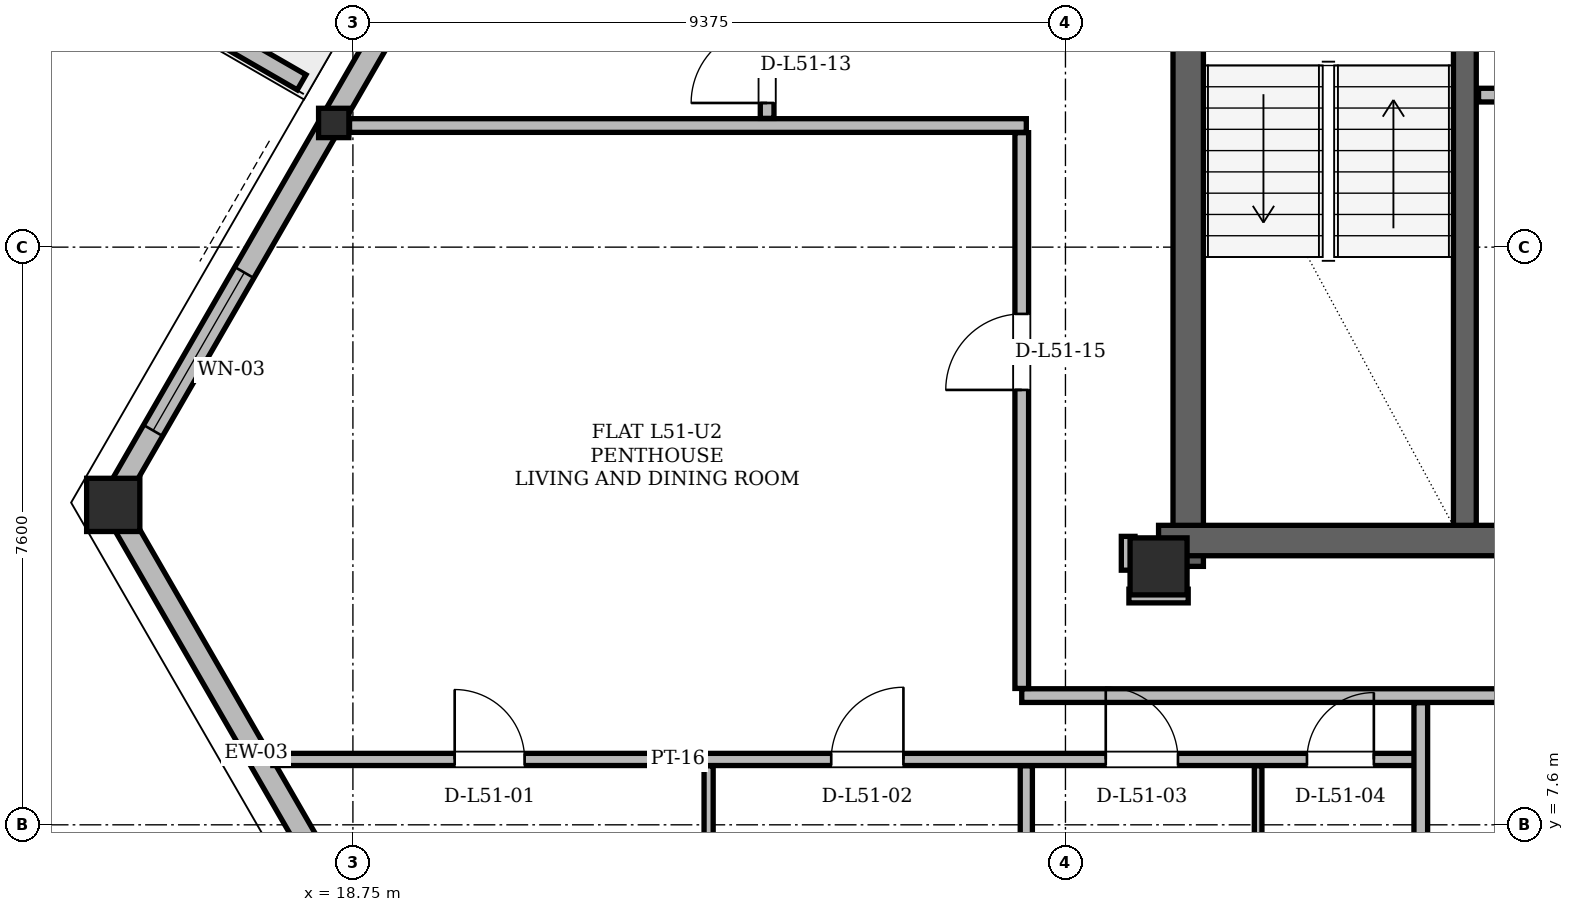
"""IFC4 building model, lengths in metres.
Left out: names, types, materials, properties, quantities, classifications, styles, units other than length and angle.
Written with IfcOpenShell. Run it as: python <this file> out.ifc"""

import sys

from ifc_helpers import new_model, si_unit, direction, frame, frame_2d, origin, origin_2d, place, context, subcontext, project, spatial, polyline, rectangle, hollow_rectangle, i_section, outline, extrude, element, fill, save


model = new_model("IFC4")
c1 = context("Model", 3, precision=1e-05, world=origin(), true_north=direction((0.0, 1.0)))
c2 = subcontext(c1, "Body", "Model", "MODEL_VIEW")
j1 = project(units=[si_unit("LENGTHUNIT", "METRE"), si_unit("PLANEANGLEUNIT", "RADIAN")], contexts=[c1])
p1 = place(None, origin())
s1 = spatial("IfcSite", under=j1, at=p1, CompositionType="ELEMENT")
p2 = place(p1, origin())
s2 = spatial("IfcBuilding", under=s1, at=p2, CompositionType="ELEMENT")
p3 = place(p2, frame((0.0, 0.0, 193.8)))
s3 = spatial("IfcBuildingStorey", under=s2, at=p3, CompositionType="ELEMENT", Elevation=193.8)
p4 = place(p3, frame((29.35, 11.0, 0.0), z_axis=(0.0, 0.0, 1.0), x_axis=(1.0, 0.0, 0.0)))
e1 = element("IfcColumn", 1, at=p4, inside=s3, PredefinedType="COLUMN", context=c2, shape_type="SweptSolid", body=[
    extrude(hollow_rectangle(XDim=0.75, YDim=0.75, WallThickness=0.06, at=origin_2d()), origin(), (0.0, 0.0, 1.0), 3.6),
])
p5 = place(p3, frame((15.574, 11.839, 0.004), z_axis=(0.012710485816, -0.016788716559, 0.99977826669), x_axis=(0.797280432378, 0.603609072286, 0.0)))
e2 = element("IfcColumn", 2, at=p5, inside=s3, PredefinedType="COLUMN", context=c2, shape_type="SweptSolid", body=[
    extrude(hollow_rectangle(XDim=0.7, YDim=0.7, WallThickness=0.055, at=origin_2d()), origin(), (0.0, 0.0, 1.0), 3.592),
])
p6 = place(p3, frame((18.472, 16.86, 0.004), z_axis=(0.014070134403, -0.014545936049, 0.99979520256), x_axis=(0.718764553201, 0.695253563143, 0.0)))
e3 = element("IfcColumn", 3, at=p6, inside=s3, PredefinedType="COLUMN", context=c2, shape_type="SweptSolid", body=[
    extrude(i_section(OverallWidth=0.399, OverallDepth=0.386, WebThickness=0.021, FlangeThickness=0.033, at=origin_2d()), origin(), (0.0, 0.0, 1.0), 3.592),
])
p7 = place(p3, frame((29.74, 11.0, 0.0), z_axis=(0.0, 0.0, 1.0), x_axis=(0.0, 1.0, 0.0)))
e4 = element("IfcWall", 4, at=p7, inside=s3, PredefinedType="SHEAR", context=c2, shape_type="SweptSolid", body=[
    extrude(rectangle(XDim=13.3, YDim=0.4, at=frame_2d((6.65, 0.0))), origin(), (0.0, 0.0, 1.0), 3.38),
])
p8 = place(p3, frame((29.35, 11.34, 0.0), z_axis=(0.0, 0.0, 1.0), x_axis=(1.0, 0.0, 0.0)))
e5 = element("IfcWall", 5, at=p8, inside=s3, PredefinedType="SHEAR", context=c2, shape_type="SweptSolid", body=[
    extrude(rectangle(XDim=7.1, YDim=0.4, at=frame_2d((3.55, 0.0))), origin(), (0.0, 0.0, 1.0), 3.38),
])
p9 = place(p3, frame((33.38, 11.54, 0.0), z_axis=(0.0, 0.0, 1.0), x_axis=(0.0, 1.0, 0.0)))
e6 = element("IfcWall", 6, at=p9, inside=s3, PredefinedType="SHEAR", context=c2, shape_type="SweptSolid", body=[
    extrude(rectangle(XDim=7.62, YDim=0.3, at=frame_2d((3.81, 0.0))), origin(), (0.0, 0.0, 1.0), 3.38),
])
p10 = place(p3, frame((15.574, 11.839, 0.0), z_axis=(0.0, 0.0, 1.0), x_axis=(0.500006337612, -0.866021744731, 0.0)))
e7 = element("IfcWall", 7, at=p10, inside=s3, PredefinedType="SOLIDWALL", context=c2, shape_type="SweptSolid", body=[
    extrude(rectangle(XDim=7.618, YDim=0.29, at=frame_2d((3.809, 0.0))), origin(), (0.0, 0.0, 1.0), 2.677),
])
p11 = place(p3, frame((33.691, 43.219, 0.0), z_axis=(0.0, 0.0, 1.0), x_axis=(-0.499997159266, -0.866027043877, 0.0)))
e8 = element("IfcWall", 8, at=p11, inside=s3, PredefinedType="SOLIDWALL", context=c2, shape_type="SweptSolid", body=[
    extrude(rectangle(XDim=36.235, YDim=0.29, at=frame_2d((18.117, 0.0))), origin(), (0.0, 0.0, 1.0), 2.677),
])
p12 = place(p11, frame((6.579, 0.0, 0.0)))
e9 = element("IfcOpeningElement", 9, at=p12, cuts=e8, PredefinedType="OPENING", context=c2, shape_type="SweptSolid", body=[
    extrude(rectangle(XDim=1.5, YDim=2.2, at=frame_2d((0.75, 1.1))), frame((0.0, 0.145, 0.0), z_axis=(0.0, -1.0, 0.0), x_axis=(1.0, 0.0, 0.0)), (0.0, 0.0, 1.0), 0.29),
])
p13 = place(p11, frame((26.7, 0.0, 0.0)))
e10 = element("IfcOpeningElement", 10, at=p13, cuts=e8, PredefinedType="OPENING", context=c2, shape_type="SweptSolid", body=[
    extrude(rectangle(XDim=1.5, YDim=2.2, at=frame_2d((0.75, 1.1))), frame((0.0, 0.145, 0.0), z_axis=(0.0, -1.0, 0.0), x_axis=(1.0, 0.0, 0.0)), (0.0, 0.0, 1.0), 0.29),
])
p14 = place(p11, frame((32.74, 0.0, 0.85)))
e11 = element("IfcOpeningElement", 11, at=p14, cuts=e8, PredefinedType="OPENING", context=c2, shape_type="SweptSolid", body=[
    extrude(rectangle(XDim=2.4, YDim=1.717, at=frame_2d((1.2, 0.858))), frame((0.0, 0.145, 0.0), z_axis=(0.0, -1.0, 0.0), x_axis=(1.0, 0.0, 0.0)), (0.0, 0.0, 1.0), 0.29),
])
p15 = place(p11, frame((21.971, 0.0, 0.85)))
e12 = element("IfcOpeningElement", 12, at=p15, cuts=e8, PredefinedType="OPENING", context=c2, shape_type="SweptSolid", body=[
    extrude(rectangle(XDim=2.0, YDim=1.717, at=frame_2d((1.0, 0.858))), frame((0.0, 0.145, 0.0), z_axis=(0.0, -1.0, 0.0), x_axis=(1.0, 0.0, 0.0)), (0.0, 0.0, 1.0), 0.29),
])
p16 = place(p11, frame((2.383, 0.0, 0.85)))
e13 = element("IfcOpeningElement", 13, at=p16, cuts=e8, PredefinedType="OPENING", context=c2, shape_type="SweptSolid", body=[
    extrude(rectangle(XDim=1.6, YDim=1.7, at=frame_2d((0.8, 0.85))), frame((0.0, 0.145, 0.0), z_axis=(0.0, -1.0, 0.0), x_axis=(1.0, 0.0, 0.0)), (0.0, 0.0, 1.0), 0.29),
])
p17 = place(p11, frame((13.348, 0.0, 0.85)))
e14 = element("IfcOpeningElement", 14, at=p17, cuts=e8, PredefinedType="OPENING", context=c2, shape_type="SweptSolid", body=[
    extrude(rectangle(XDim=3.0, YDim=1.717, at=frame_2d((1.5, 0.858))), frame((0.0, 0.145, 0.0), z_axis=(0.0, -1.0, 0.0), x_axis=(1.0, 0.0, 0.0)), (0.0, 0.0, 1.0), 0.29),
])
p18 = place(p3, frame((18.075, 17.368, 0.0), z_axis=(0.0, 0.0, 1.0), x_axis=(-0.866012356593, 0.500022597718, 0.0)))
e15 = element("IfcWall", 15, at=p18, inside=s3, PredefinedType="PARAPET", context=c2, shape_type="SweptSolid", body=[
    extrude(outline(polyline([(0.0, 0.0), (2.042, 0.0), (2.042, 1.1), (0.0, 1.32), (0.0, 0.0)])), frame((0.0, 0.115, 0.0), z_axis=(0.0, -1.0, 0.0), x_axis=(1.0, 0.0, 0.0)), (0.0, 0.0, 1.0), 0.23),
])
p19 = place(p3, frame((33.56, 17.2, 0.0), z_axis=(0.0, 0.0, 1.0), x_axis=(1.0, 0.0, 0.0)))
e16 = element("IfcWall", 16, at=p19, inside=s3, PredefinedType="PARTITIONING", context=c2, shape_type="SweptSolid", body=[
    extrude(rectangle(XDim=2.66, YDim=0.18, at=frame_2d((1.33, 0.0))), origin(), (0.0, 0.0, 1.0), 3.38),
])
p20 = place(p3, frame((17.697, 8.46, 0.0), z_axis=(0.0, 0.0, 1.0), x_axis=(1.0, 0.0, 0.0)))
e17 = element("IfcWall", 17, at=p20, inside=s3, PredefinedType="PARTITIONING", context=c2, shape_type="SweptSolid", body=[
    extrude(rectangle(XDim=15.153, YDim=0.16, at=frame_2d((7.577, 0.0))), origin(), (0.0, 0.0, 1.0), 2.913),
])
p21 = place(p20, frame((2.392, 0.0, 0.0)))
e18 = element("IfcOpeningElement", 18, at=p21, cuts=e17, PredefinedType="OPENING", context=c2, shape_type="SweptSolid", body=[
    extrude(rectangle(XDim=0.92, YDim=2.12, at=frame_2d((0.46, 1.06))), frame((0.0, 0.08, 0.0), z_axis=(0.0, -1.0, 0.0), x_axis=(1.0, 0.0, 0.0)), (0.0, 0.0, 1.0), 0.16),
])
p22 = place(p20, frame((7.346, 0.0, 0.0)))
e19 = element("IfcOpeningElement", 19, at=p22, cuts=e17, PredefinedType="OPENING", context=c2, shape_type="SweptSolid", body=[
    extrude(rectangle(XDim=0.95, YDim=2.1, at=frame_2d((0.475, 1.05))), frame((0.0, 0.08, 0.0), z_axis=(0.0, -1.0, 0.0), x_axis=(1.0, 0.0, 0.0)), (0.0, 0.0, 1.0), 0.16),
])
p23 = place(p20, frame((10.958, 0.0, 0.0)))
e20 = element("IfcOpeningElement", 20, at=p23, cuts=e17, PredefinedType="OPENING", context=c2, shape_type="SweptSolid", body=[
    extrude(rectangle(XDim=0.95, YDim=2.1, at=frame_2d((0.475, 1.05))), frame((0.0, 0.08, 0.0), z_axis=(0.0, -1.0, 0.0), x_axis=(1.0, 0.0, 0.0)), (0.0, 0.0, 1.0), 0.16),
])
p24 = place(p20, frame((13.606, 0.0, 0.0)))
e21 = element("IfcOpeningElement", 21, at=p24, cuts=e17, PredefinedType="OPENING", context=c2, shape_type="SweptSolid", body=[
    extrude(rectangle(XDim=0.88, YDim=2.08, at=frame_2d((0.44, 1.04))), frame((0.0, 0.08, 0.0), z_axis=(0.0, -1.0, 0.0), x_axis=(1.0, 0.0, 0.0)), (0.0, 0.0, 1.0), 0.16),
])
p25 = place(p3, frame((27.55, 9.3, 0.0), z_axis=(0.0, 0.0, 1.0), x_axis=(1.0, 0.0, 0.0)))
e22 = element("IfcWall", 22, at=p25, inside=s3, PredefinedType="PARTITIONING", context=c2, shape_type="SweptSolid", body=[
    extrude(rectangle(XDim=21.25, YDim=0.18, at=frame_2d((10.625, 0.0))), origin(), (0.0, 0.0, 1.0), 2.913),
])
p26 = place(p25, frame((7.1, 0.0, 0.0)))
e23 = element("IfcOpeningElement", 23, at=p26, cuts=e22, PredefinedType="OPENING", context=c2, shape_type="SweptSolid", body=[
    extrude(rectangle(XDim=1.3, YDim=2.2, at=frame_2d((0.65, 1.1))), frame((0.0, 0.09, 0.0), z_axis=(0.0, -1.0, 0.0), x_axis=(1.0, 0.0, 0.0)), (0.0, 0.0, 1.0), 0.18),
])
p27 = place(p25, frame((18.46, 0.0, 0.0)))
e24 = element("IfcOpeningElement", 24, at=p27, cuts=e22, PredefinedType="OPENING", context=c2, shape_type="SweptSolid", body=[
    extrude(rectangle(XDim=1.0, YDim=2.18, at=frame_2d((0.5, 1.09))), frame((0.0, 0.09, 0.0), z_axis=(0.0, -1.0, 0.0), x_axis=(1.0, 0.0, 0.0)), (0.0, 0.0, 1.0), 0.18),
])
p28 = place(p3, frame((28.96, 10.61, 0.0), z_axis=(0.0, 0.0, 1.0), x_axis=(1.0, 0.0, 0.0)))
e25 = element("IfcWall", 25, at=p28, inside=s3, PredefinedType="PARTITIONING", context=c2, shape_type="SweptSolid", body=[
    extrude(rectangle(XDim=0.78, YDim=0.18, at=frame_2d((0.39, 0.0))), origin(), (0.0, 0.0, 1.0), 3.38),
])
p29 = place(p3, frame((18.706, 16.8, 0.0), z_axis=(0.0, 0.0, 1.0), x_axis=(1.0, 0.0, 0.0)))
e26 = element("IfcWall", 26, at=p29, inside=s3, PredefinedType="PARTITIONING", context=c2, shape_type="SweptSolid", body=[
    extrude(rectangle(XDim=8.904, YDim=0.18, at=frame_2d((4.452, 0.0))), origin(), (0.0, 0.0, 1.0), 3.38),
])
p30 = place(p3, frame((23.43, 5.391, 0.0), z_axis=(0.0, 0.0, 1.0), x_axis=(0.0, 1.0, 0.0)))
e27 = element("IfcWall", 27, at=p30, inside=s3, PredefinedType="PARTITIONING", context=c2, shape_type="SweptSolid", body=[
    extrude(rectangle(XDim=2.985, YDim=0.12, at=frame_2d((1.493, 0.0))), origin(), (0.0, 0.0, 1.0), 2.913),
])
p31 = place(p3, frame((24.2, 16.894, 0.0), z_axis=(0.0, 0.0, 1.0), x_axis=(0.0, 1.0, 0.0)))
e28 = element("IfcWall", 28, at=p31, inside=s3, PredefinedType="PARTITIONING", context=c2, shape_type="SweptSolid", body=[
    extrude(rectangle(XDim=1.462, YDim=0.18, at=frame_2d((0.731, 0.0))), origin(), (0.0, 0.0, 1.0), 3.38),
])
p32 = place(p31, frame((0.203, 0.0, 0.0)))
e29 = element("IfcOpeningElement", 29, at=p32, cuts=e28, PredefinedType="OPENING", context=c2, shape_type="SweptSolid", body=[
    extrude(rectangle(XDim=1.0, YDim=2.18, at=frame_2d((0.5, 1.09))), frame((0.0, 0.09, 0.0), z_axis=(0.0, -1.0, 0.0), x_axis=(1.0, 0.0, 0.0)), (0.0, 0.0, 1.0), 0.18),
])
p33 = place(p3, frame((27.55, 9.394, 0.0), z_axis=(0.0, 0.0, 1.0), x_axis=(0.0, 1.0, 0.0)))
e30 = element("IfcWall", 30, at=p33, inside=s3, PredefinedType="PARTITIONING", context=c2, shape_type="SweptSolid", body=[
    extrude(rectangle(XDim=7.312, YDim=0.18, at=frame_2d((3.656, 0.0))), origin(), (0.0, 0.0, 1.0), 2.913),
])
p34 = place(p33, frame((3.927, 0.0, 0.0)))
e31 = element("IfcOpeningElement", 31, at=p34, cuts=e30, PredefinedType="OPENING", context=c2, shape_type="SweptSolid", body=[
    extrude(rectangle(XDim=1.0, YDim=2.18, at=frame_2d((0.5, 1.09))), frame((0.0, 0.09, 0.0), z_axis=(0.0, -1.0, 0.0), x_axis=(1.0, 0.0, 0.0)), (0.0, 0.0, 1.0), 0.18),
])
p35 = place(p3, frame((27.61, 5.391, 0.0), z_axis=(0.0, 0.0, 1.0), x_axis=(0.0, 1.0, 0.0)))
e32 = element("IfcWall", 32, at=p35, inside=s3, PredefinedType="PARTITIONING", context=c2, shape_type="SweptSolid", body=[
    extrude(rectangle(XDim=2.985, YDim=0.16, at=frame_2d((1.493, 0.0))), origin(), (0.0, 0.0, 1.0), 2.966),
])
p36 = place(p3, frame((28.95, 10.95, 0.0), z_axis=(0.0, 0.0, 1.0), x_axis=(0.0, 1.0, 0.0)))
e33 = element("IfcWall", 33, at=p36, inside=s3, PredefinedType="PARTITIONING", context=c2, shape_type="SweptSolid", body=[
    extrude(rectangle(XDim=0.445, YDim=0.18, at=frame_2d((0.223, 0.0))), origin(), (0.0, 0.0, 1.0), 2.913),
])
p37 = place(p3, frame((30.66, 5.391, 0.0), z_axis=(0.0, 0.0, 1.0), x_axis=(0.0, 1.0, 0.0)))
e34 = element("IfcWall", 34, at=p37, inside=s3, PredefinedType="PARTITIONING", context=c2, shape_type="SweptSolid", body=[
    extrude(rectangle(XDim=2.985, YDim=0.1, at=frame_2d((1.493, 0.0))), origin(), (0.0, 0.0, 1.0), 2.966),
])
p38 = place(p3, frame((32.8, 5.391, 0.0), z_axis=(0.0, 0.0, 1.0), x_axis=(0.0, 1.0, 0.0)))
e35 = element("IfcWall", 35, at=p38, inside=s3, PredefinedType="PARTITIONING", context=c2, shape_type="SweptSolid", body=[
    extrude(rectangle(XDim=3.815, YDim=0.18, at=frame_2d((1.908, 0.0))), origin(), (0.0, 0.0, 1.0), 2.966),
])
p39 = place(p14, origin())
e36 = element("IfcWindow", 36, at=p39, inside=s3, PartitioningType="SINGLE_PANEL", PredefinedType="WINDOW", context=c2, shape_type="SweptSolid", body=[
    extrude(rectangle(XDim=2.4, YDim=1.717, at=frame_2d((1.2, 0.858))), frame((0.0, 0.03, 0.0), z_axis=(0.0, -1.0, 0.0), x_axis=(1.0, 0.0, 0.0)), (0.0, 0.0, 1.0), 0.06),
])
fill(e11, e36)
p40 = place(p21, origin())
e37 = element("IfcDoor", 37, at=p40, inside=s3, OperationType="SINGLE_SWING_LEFT", PredefinedType="DOOR", context=c2, shape_type="SweptSolid", body=[
    extrude(rectangle(XDim=0.92, YDim=2.12, at=frame_2d((0.46, 1.06))), frame((0.0, 0.025, 0.0), z_axis=(0.0, -1.0, 0.0), x_axis=(1.0, 0.0, 0.0)), (0.0, 0.0, 1.0), 0.05),
])
fill(e18, e37)
p41 = place(p22, origin())
e38 = element("IfcDoor", 38, at=p41, inside=s3, OperationType="SINGLE_SWING_RIGHT", PredefinedType="DOOR", context=c2, shape_type="SweptSolid", body=[
    extrude(rectangle(XDim=0.95, YDim=2.1, at=frame_2d((0.475, 1.05))), frame((0.0, 0.025, 0.0), z_axis=(0.0, -1.0, 0.0), x_axis=(1.0, 0.0, 0.0)), (0.0, 0.0, 1.0), 0.05),
])
fill(e19, e38)
p42 = place(p23, origin())
e39 = element("IfcDoor", 39, at=p42, inside=s3, OperationType="SINGLE_SWING_LEFT", PredefinedType="DOOR", context=c2, shape_type="SweptSolid", body=[
    extrude(rectangle(XDim=0.95, YDim=2.1, at=frame_2d((0.475, 1.05))), frame((0.0, 0.025, 0.0), z_axis=(0.0, -1.0, 0.0), x_axis=(1.0, 0.0, 0.0)), (0.0, 0.0, 1.0), 0.05),
])
fill(e20, e39)
p43 = place(p24, origin())
e40 = element("IfcDoor", 40, at=p43, inside=s3, OperationType="SINGLE_SWING_RIGHT", PredefinedType="DOOR", context=c2, shape_type="SweptSolid", body=[
    extrude(rectangle(XDim=0.88, YDim=2.08, at=frame_2d((0.44, 1.04))), frame((0.0, 0.025, 0.0), z_axis=(0.0, -1.0, 0.0), x_axis=(1.0, 0.0, 0.0)), (0.0, 0.0, 1.0), 0.05),
])
fill(e21, e40)
p44 = place(p32, origin())
e41 = element("IfcDoor", 41, at=p44, inside=s3, OperationType="SINGLE_SWING_LEFT", PredefinedType="DOOR", context=c2, shape_type="SweptSolid", body=[
    extrude(rectangle(XDim=1.0, YDim=2.18, at=frame_2d((0.5, 1.09))), frame((0.0, 0.025, 0.0), z_axis=(0.0, -1.0, 0.0), x_axis=(1.0, 0.0, 0.0)), (0.0, 0.0, 1.0), 0.05),
])
fill(e29, e41)
p45 = place(p34, origin())
e42 = element("IfcDoor", 42, at=p45, inside=s3, OperationType="SINGLE_SWING_LEFT", PredefinedType="DOOR", context=c2, shape_type="SweptSolid", body=[
    extrude(rectangle(XDim=1.0, YDim=2.18, at=frame_2d((0.5, 1.09))), frame((0.0, 0.025, 0.0), z_axis=(0.0, -1.0, 0.0), x_axis=(1.0, 0.0, 0.0)), (0.0, 0.0, 1.0), 0.05),
])
fill(e31, e42)
save(model, sys.argv[1])
